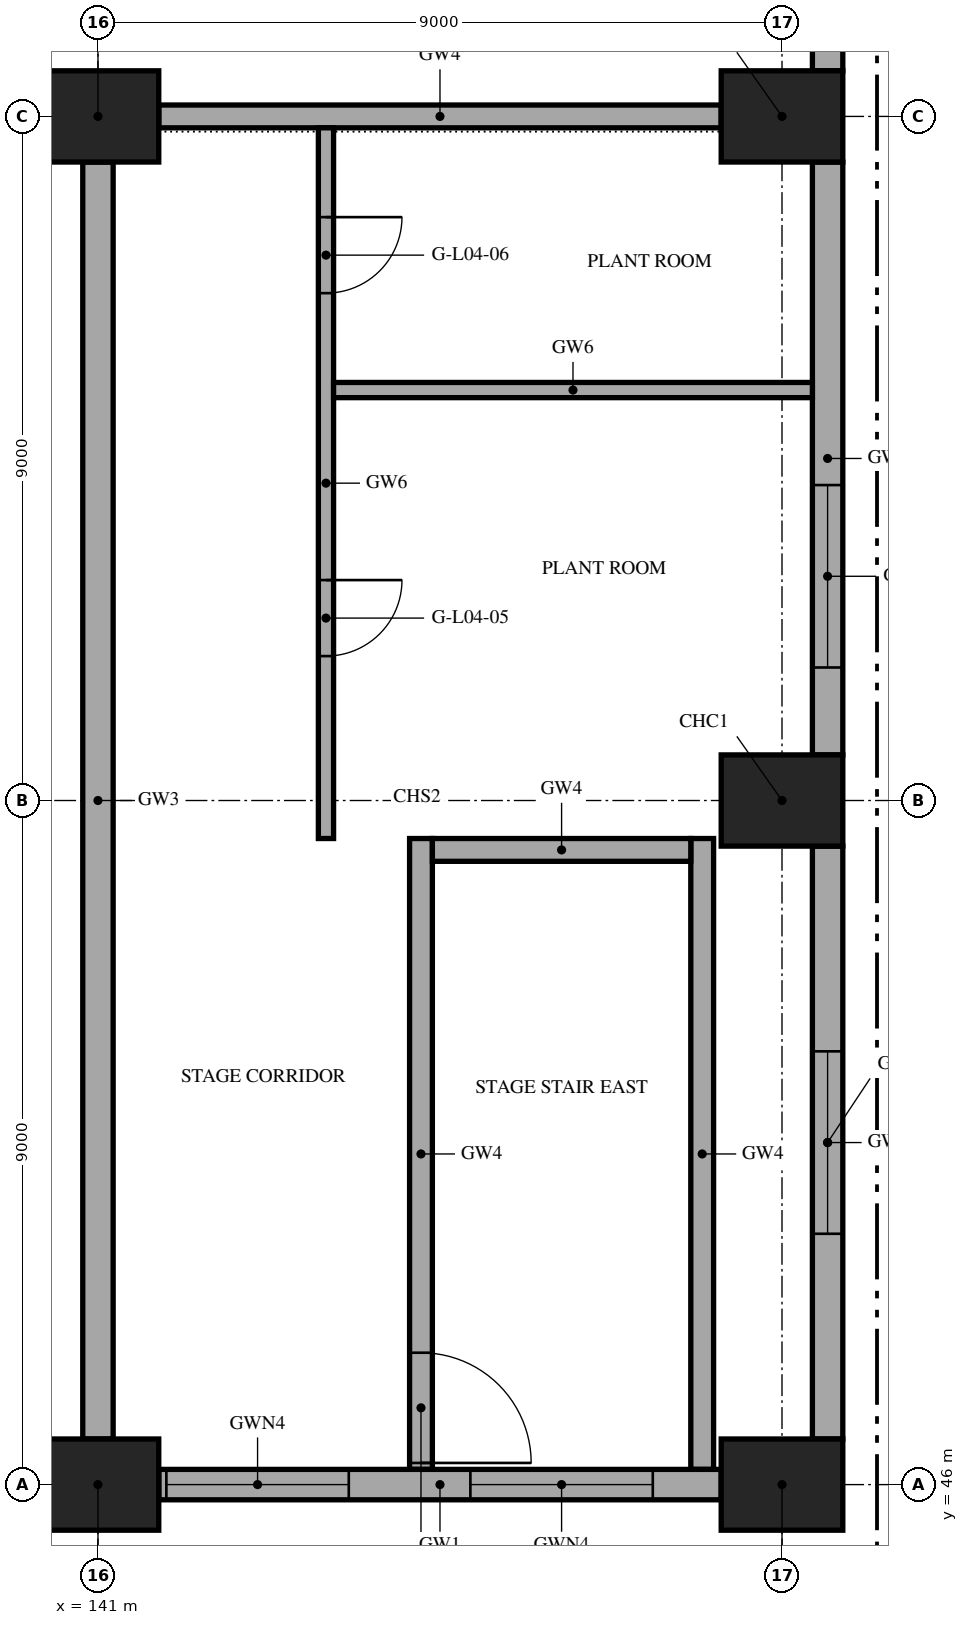
"""IFC4 building model, lengths in metres.
Left out: names, types, materials, properties, quantities, classifications, styles, units other than length and angle.
Written with IfcOpenShell. Run it as: python <this file> out.ifc"""

import sys

from ifc_helpers import new_model, si_unit, direction, frame, frame_2d, origin, origin_2d, place, context, subcontext, project, spatial, rectangle, extrude, element, fill, save


model = new_model("IFC4")
c1 = context("Model", 3, precision=1e-05, world=origin(), true_north=direction((0.0, 1.0)))
c2 = subcontext(c1, "Body", "Model", "MODEL_VIEW")
j1 = project(units=[si_unit("LENGTHUNIT", "METRE"), si_unit("PLANEANGLEUNIT", "RADIAN")], contexts=[c1])
p1 = place(None, origin())
s1 = spatial("IfcSite", under=j1, at=p1, CompositionType="ELEMENT")
p2 = place(p1, origin())
s2 = spatial("IfcBuilding", under=s1, at=p2, CompositionType="ELEMENT")
p3 = place(p2, frame((0.0, 0.0, 19.2)))
s3 = spatial("IfcBuildingStorey", under=s2, at=p3, CompositionType="ELEMENT", Elevation=19.2)
for number, where, z_axis, x_axis in (
    (1, (141.0, 46.0, 0.0), (0.0, 0.0, 1.0), (1.0, 0.0, 0.0)),
    (2, (150.0, 46.0, 0.0), (0.0, 0.0, 1.0), (1.0, 0.0, 0.0)),
    (3, (150.0, 55.0, 0.0), (0.0, 0.0, 1.0), (1.0, 0.0, 0.0)),
    (4, (141.0, 64.0, 0.0), (0.0, 0.0, 1.0), (1.0, 0.0, 0.0)),
    (5, (150.0, 64.0, 0.0), (0.0, 0.0, 1.0), (1.0, 0.0, 0.0)),
):
    element("IfcColumn", number, at=place(p3, frame(where, z_axis=z_axis, x_axis=x_axis)), inside=s3, PredefinedType="COLUMN", context=c2, shape_type="SweptSolid", body=[
        extrude(rectangle(XDim=1.6, YDim=1.2, at=origin_2d()), origin(), (0.0, 0.0, 1.0), 4.2),
    ])
p4 = place(p3, frame((141.0, 46.6, 0.0), z_axis=(0.0, 0.0, 1.0), x_axis=(0.0, 1.0, 0.0)))
e6 = element("IfcWall", 6, at=p4, inside=s3, PredefinedType="SHEAR", context=c2, shape_type="SweptSolid", body=[
    extrude(rectangle(XDim=16.8, YDim=0.4, at=frame_2d((8.4, 0.0))), origin(), (0.0, 0.0, 1.0), 4.2),
])
p5 = place(p3, frame((141.8, 64.0, 0.0), z_axis=(0.0, 0.0, 1.0), x_axis=(1.0, 0.0, 0.0)))
e7 = element("IfcWall", 7, at=p5, inside=s3, PredefinedType="SHEAR", context=c2, shape_type="SweptSolid", body=[
    extrude(rectangle(XDim=7.4, YDim=0.3, at=frame_2d((3.7, 0.0))), origin(), (0.0, 0.0, 1.0), 4.2),
])
p6 = place(p3, frame((145.25, 46.2, 0.0), z_axis=(0.0, 0.0, 1.0), x_axis=(0.0, 1.0, 0.0)))
e8 = element("IfcWall", 8, at=p6, inside=s3, PredefinedType="SHEAR", context=c2, shape_type="SweptSolid", body=[
    extrude(rectangle(XDim=8.3, YDim=0.3, at=frame_2d((4.15, 0.0))), origin(), (0.0, 0.0, 1.0), 4.2),
])
p7 = place(p6, frame((0.085, 0.0, 0.0)))
e9 = element("IfcOpeningElement", 9, at=p7, cuts=e8, PredefinedType="OPENING", context=c2, shape_type="SweptSolid", body=[
    extrude(rectangle(XDim=1.45, YDim=2.1, at=frame_2d((0.725, 1.05))), frame((0.0, 0.16, 0.0), z_axis=(0.0, -1.0, 0.0), x_axis=(1.0, 0.0, 0.0)), (0.0, 0.0, 1.0), 0.32),
])
p8 = place(p3, frame((148.95, 46.2, 0.0), z_axis=(0.0, 0.0, 1.0), x_axis=(0.0, 1.0, 0.0)))
e10 = element("IfcWall", 10, at=p8, inside=s3, PredefinedType="SHEAR", context=c2, shape_type="SweptSolid", body=[
    extrude(rectangle(XDim=8.3, YDim=0.3, at=frame_2d((4.15, 0.0))), origin(), (0.0, 0.0, 1.0), 4.2),
])
p9 = place(p3, frame((145.4, 54.35, 0.0), z_axis=(0.0, 0.0, 1.0), x_axis=(1.0, 0.0, 0.0)))
e11 = element("IfcWall", 11, at=p9, inside=s3, PredefinedType="SHEAR", context=c2, shape_type="SweptSolid", body=[
    extrude(rectangle(XDim=3.4, YDim=0.3, at=frame_2d((1.7, 0.0))), origin(), (0.0, 0.0, 1.0), 4.2),
])
p10 = place(p3, frame((150.6, 46.6, 0.0), z_axis=(0.0, 0.0, 1.0), x_axis=(0.0, 1.0, 0.0)))
e12 = element("IfcWall", 12, at=p10, inside=s3, PredefinedType="SOLIDWALL", context=c2, shape_type="SweptSolid", body=[
    extrude(rectangle(XDim=7.8, YDim=0.4, at=frame_2d((3.9, 0.0))), origin(), (0.0, 0.0, 1.0), 4.2),
])
p11 = place(p10, frame((2.7, 0.0, 1.2)))
e13 = element("IfcOpeningElement", 13, at=p11, cuts=e12, PredefinedType="OPENING", context=c2, shape_type="SweptSolid", body=[
    extrude(rectangle(XDim=2.4, YDim=1.8, at=frame_2d((1.2, 0.9))), frame((0.0, 0.21, 0.0), z_axis=(0.0, -1.0, 0.0), x_axis=(1.0, 0.0, 0.0)), (0.0, 0.0, 1.0), 0.42),
])
p12 = place(p3, frame((150.6, 55.6, 0.0), z_axis=(0.0, 0.0, 1.0), x_axis=(0.0, 1.0, 0.0)))
e14 = element("IfcWall", 14, at=p12, inside=s3, PredefinedType="SOLIDWALL", context=c2, shape_type="SweptSolid", body=[
    extrude(rectangle(XDim=7.8, YDim=0.4, at=frame_2d((3.9, 0.0))), origin(), (0.0, 0.0, 1.0), 4.2),
])
p13 = place(p12, frame((1.15, 0.0, 1.2)))
e15 = element("IfcOpeningElement", 15, at=p13, cuts=e14, PredefinedType="OPENING", context=c2, shape_type="SweptSolid", body=[
    extrude(rectangle(XDim=2.4, YDim=1.8, at=frame_2d((1.2, 0.9))), frame((0.0, 0.21, 0.0), z_axis=(0.0, -1.0, 0.0), x_axis=(1.0, 0.0, 0.0)), (0.0, 0.0, 1.0), 0.42),
])
p14 = place(p3, frame((150.6, 64.6, 0.0), z_axis=(0.0, 0.0, 1.0), x_axis=(0.0, 1.0, 0.0)))
e16 = element("IfcWall", 16, at=p14, inside=s3, PredefinedType="SOLIDWALL", context=c2, shape_type="SweptSolid", body=[
    extrude(rectangle(XDim=7.8, YDim=0.4, at=frame_2d((3.9, 0.0))), origin(), (0.0, 0.0, 1.0), 4.2),
])
p15 = place(p14, frame((0.9, 0.0, 2.4)))
e17 = element("IfcOpeningElement", 17, at=p15, cuts=e16, PredefinedType="OPENING", context=c2, shape_type="SweptSolid", body=[
    extrude(rectangle(XDim=6.0, YDim=1.4, at=frame_2d((3.0, 0.7))), frame((0.0, 0.21, 0.0), z_axis=(0.0, -1.0, 0.0), x_axis=(1.0, 0.0, 0.0)), (0.0, 0.0, 1.0), 0.42),
])
p16 = place(p3, frame((141.8, 46.0, 0.0), z_axis=(0.0, 0.0, 1.0), x_axis=(1.0, 0.0, 0.0)))
e18 = element("IfcWall", 18, at=p16, inside=s3, PredefinedType="SOLIDWALL", context=c2, shape_type="SweptSolid", body=[
    extrude(rectangle(XDim=7.4, YDim=0.4, at=frame_2d((3.7, 0.0))), origin(), (0.0, 0.0, 1.0), 4.2),
])
p17 = place(p16, frame((4.1, 0.0, 1.2)))
e19 = element("IfcOpeningElement", 19, at=p17, cuts=e18, PredefinedType="OPENING", context=c2, shape_type="SweptSolid", body=[
    extrude(rectangle(XDim=2.4, YDim=1.8, at=frame_2d((1.2, 0.9))), frame((0.0, 0.21, 0.0), z_axis=(0.0, -1.0, 0.0), x_axis=(1.0, 0.0, 0.0)), (0.0, 0.0, 1.0), 0.42),
])
p18 = place(p16, frame((0.1, 0.0, 1.2)))
e20 = element("IfcOpeningElement", 20, at=p18, cuts=e18, PredefinedType="OPENING", context=c2, shape_type="SweptSolid", body=[
    extrude(rectangle(XDim=2.4, YDim=1.8, at=frame_2d((1.2, 0.9))), frame((0.0, 0.21, 0.0), z_axis=(0.0, -1.0, 0.0), x_axis=(1.0, 0.0, 0.0)), (0.0, 0.0, 1.0), 0.42),
])
p19 = place(p3, frame((144.0, 54.5, 0.0), z_axis=(0.0, 0.0, 1.0), x_axis=(0.0, 1.0, 0.0)))
e21 = element("IfcWall", 21, at=p19, inside=s3, PredefinedType="PARTITIONING", context=c2, shape_type="SweptSolid", body=[
    extrude(rectangle(XDim=9.35, YDim=0.2, at=frame_2d((4.675, 0.0))), origin(), (0.0, 0.0, 1.0), 4.2),
])
p20 = place(p19, frame((2.4, 0.0, 0.0)))
e22 = element("IfcOpeningElement", 22, at=p20, cuts=e21, PredefinedType="OPENING", context=c2, shape_type="SweptSolid", body=[
    extrude(rectangle(XDim=1.0, YDim=2.1, at=frame_2d((0.5, 1.05))), frame((0.0, 0.11, 0.0), z_axis=(0.0, -1.0, 0.0), x_axis=(1.0, 0.0, 0.0)), (0.0, 0.0, 1.0), 0.22),
])
p21 = place(p19, frame((7.175, 0.0, 0.0)))
e23 = element("IfcOpeningElement", 23, at=p21, cuts=e21, PredefinedType="OPENING", context=c2, shape_type="SweptSolid", body=[
    extrude(rectangle(XDim=1.0, YDim=2.1, at=frame_2d((0.5, 1.05))), frame((0.0, 0.11, 0.0), z_axis=(0.0, -1.0, 0.0), x_axis=(1.0, 0.0, 0.0)), (0.0, 0.0, 1.0), 0.22),
])
p22 = place(p3, frame((144.1, 60.4, 0.0), z_axis=(0.0, 0.0, 1.0), x_axis=(1.0, 0.0, 0.0)))
e24 = element("IfcWall", 24, at=p22, inside=s3, PredefinedType="PARTITIONING", context=c2, shape_type="SweptSolid", body=[
    extrude(rectangle(XDim=6.3, YDim=0.2, at=frame_2d((3.15, 0.0))), origin(), (0.0, 0.0, 1.0), 4.2),
])
p23 = place(p17, origin())
e25 = element("IfcWindow", 25, at=p23, inside=s3, PartitioningType="SINGLE_PANEL", PredefinedType="WINDOW", context=c2, shape_type="SweptSolid", body=[
    extrude(rectangle(XDim=2.4, YDim=1.8, at=frame_2d((1.2, 0.9))), frame((0.0, 0.03, 0.0), z_axis=(0.0, -1.0, 0.0), x_axis=(1.0, 0.0, 0.0)), (0.0, 0.0, 1.0), 0.06),
])
fill(e19, e25)
p24 = place(p18, origin())
e26 = element("IfcWindow", 26, at=p24, inside=s3, PartitioningType="SINGLE_PANEL", PredefinedType="WINDOW", context=c2, shape_type="SweptSolid", body=[
    extrude(rectangle(XDim=2.4, YDim=1.8, at=frame_2d((1.2, 0.9))), frame((0.0, 0.03, 0.0), z_axis=(0.0, -1.0, 0.0), x_axis=(1.0, 0.0, 0.0)), (0.0, 0.0, 1.0), 0.06),
])
fill(e20, e26)
p25 = place(p11, origin())
e27 = element("IfcWindow", 27, at=p25, inside=s3, PartitioningType="SINGLE_PANEL", PredefinedType="WINDOW", context=c2, shape_type="SweptSolid", body=[
    extrude(rectangle(XDim=2.4, YDim=1.8, at=frame_2d((1.2, 0.9))), frame((0.0, 0.03, 0.0), z_axis=(0.0, -1.0, 0.0), x_axis=(1.0, 0.0, 0.0)), (0.0, 0.0, 1.0), 0.06),
])
fill(e13, e27)
p26 = place(p13, origin())
e28 = element("IfcWindow", 28, at=p26, inside=s3, PartitioningType="SINGLE_PANEL", PredefinedType="WINDOW", context=c2, shape_type="SweptSolid", body=[
    extrude(rectangle(XDim=2.4, YDim=1.8, at=frame_2d((1.2, 0.9))), frame((0.0, 0.03, 0.0), z_axis=(0.0, -1.0, 0.0), x_axis=(1.0, 0.0, 0.0)), (0.0, 0.0, 1.0), 0.06),
])
fill(e15, e28)
p27 = place(p7, frame((1.45, 0.0, 0.0), z_axis=(0.0, 0.0, 1.0), x_axis=(-1.0, 0.0, 0.0)))
e29 = element("IfcDoor", 29, at=p27, inside=s3, OperationType="SINGLE_SWING_RIGHT", PredefinedType="DOOR", context=c2, shape_type="SweptSolid", body=[
    extrude(rectangle(XDim=1.45, YDim=2.1, at=frame_2d((0.725, 1.05))), frame((0.0, 0.025, 0.0), z_axis=(0.0, -1.0, 0.0), x_axis=(1.0, 0.0, 0.0)), (0.0, 0.0, 1.0), 0.05),
])
fill(e9, e29)
p28 = place(p20, frame((1.0, 0.0, 0.0), z_axis=(0.0, 0.0, 1.0), x_axis=(-1.0, 0.0, 0.0)))
e30 = element("IfcDoor", 30, at=p28, inside=s3, OperationType="SINGLE_SWING_LEFT", PredefinedType="DOOR", context=c2, shape_type="SweptSolid", body=[
    extrude(rectangle(XDim=1.0, YDim=2.1, at=frame_2d((0.5, 1.05))), frame((0.0, 0.025, 0.0), z_axis=(0.0, -1.0, 0.0), x_axis=(1.0, 0.0, 0.0)), (0.0, 0.0, 1.0), 0.05),
])
fill(e22, e30)
p29 = place(p21, frame((1.0, 0.0, 0.0), z_axis=(0.0, 0.0, 1.0), x_axis=(-1.0, 0.0, 0.0)))
e31 = element("IfcDoor", 31, at=p29, inside=s3, OperationType="SINGLE_SWING_LEFT", PredefinedType="DOOR", context=c2, shape_type="SweptSolid", body=[
    extrude(rectangle(XDim=1.0, YDim=2.1, at=frame_2d((0.5, 1.05))), frame((0.0, 0.025, 0.0), z_axis=(0.0, -1.0, 0.0), x_axis=(1.0, 0.0, 0.0)), (0.0, 0.0, 1.0), 0.05),
])
fill(e23, e31)
save(model, sys.argv[1])
